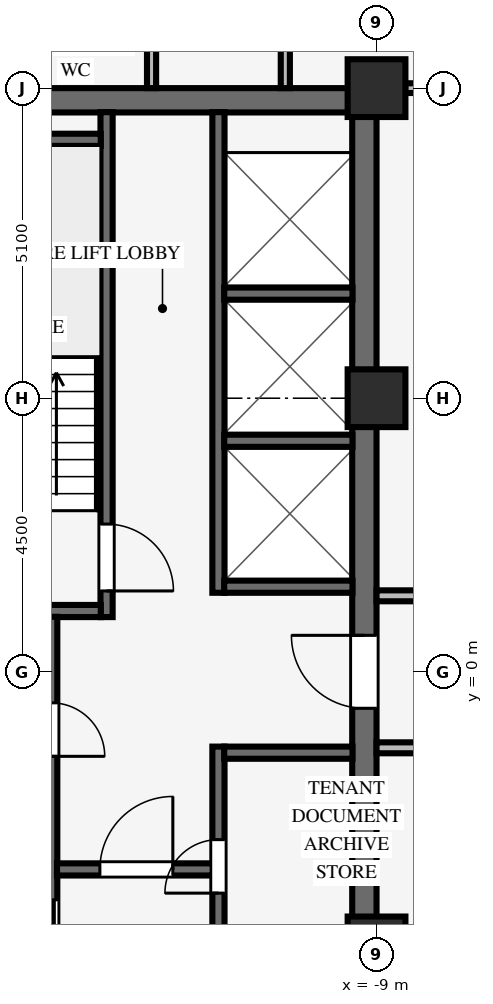
"""IFC4 building model, lengths in metres.
Left out: names, types, materials, properties, quantities, classifications, styles, units other than length and angle.
Written with IfcOpenShell. Run it as: python <this file> out.ifc"""

import sys

from ifc_helpers import new_model, si_unit, direction, frame, frame_2d, origin, origin_2d, place, context, subcontext, project, spatial, rectangle, extrude, source, transform, mapped, element, fill, save


model = new_model("IFC4")
c1 = context("Model", 3, precision=1e-05, world=origin(), true_north=direction((0.0, 1.0)))
c2 = subcontext(c1, "Body", "Model", "MODEL_VIEW")
j1 = project(units=[si_unit("LENGTHUNIT", "METRE"), si_unit("PLANEANGLEUNIT", "RADIAN")], contexts=[c1])
p1 = place(None, origin())
s1 = spatial("IfcSite", under=j1, at=p1, CompositionType="ELEMENT")
p2 = place(p1, origin())
s2 = spatial("IfcBuilding", under=s1, at=p2, CompositionType="ELEMENT")
p3 = place(p2, frame((0.0, 0.0, 164.0)))
s3 = spatial("IfcBuildingStorey", under=s2, at=p3, CompositionType="ELEMENT", Elevation=164.0)
p4 = place(p3, frame((-17.5, 9.4, 0.0), z_axis=(0.0, 0.0, 1.0), x_axis=(1.0, 0.0, 0.0)))
e1 = element("IfcWall", 1, at=p4, inside=s3, PredefinedType="SHEAR", context=c2, shape_type="SweptSolid", body=[
    extrude(rectangle(XDim=8.5, YDim=0.4, at=frame_2d((4.25, 0.0))), origin(), (0.0, 0.0, 1.0), 3.25),
])
p5 = place(p3, frame((-9.2, -9.205, 0.0), z_axis=(0.0, 0.0, 1.0), x_axis=(0.0, 1.0, 0.0)))
e2 = element("IfcWall", 2, at=p5, inside=s3, PredefinedType="SHEAR", context=c2, shape_type="SweptSolid", body=[
    extrude(rectangle(XDim=18.41, YDim=0.4, at=frame_2d((9.205, 0.0))), origin(), (0.0, 0.0, 1.0), 3.25),
])
p6 = place(p5, frame((8.605, 0.0, 0.0)))
e3 = element("IfcOpeningElement", 3, at=p6, cuts=e2, PredefinedType="OPENING", context=c2, shape_type="SweptSolid", body=[
    extrude(rectangle(XDim=1.2, YDim=2.15, at=frame_2d((0.6, 1.075))), frame((0.0, 0.21, 0.0), z_axis=(0.0, -1.0, 0.0), x_axis=(1.0, 0.0, 0.0)), (0.0, 0.0, 1.0), 0.42),
])
for number, where, z_axis, x_axis in (
    (4, (-9.0, -4.5, 0.0), (0.0, 0.0, 1.0), (1.0, 0.0, 0.0)),
    (5, (-9.0, 4.5, 0.0), (0.0, 0.0, 1.0), (1.0, 0.0, 0.0)),
    (6, (-9.0, 9.6, 0.0), (0.0, 0.0, 1.0), (1.0, 0.0, 0.0)),
):
    element("IfcColumn", number, at=place(p3, frame(where, z_axis=z_axis, x_axis=x_axis)), inside=s3, PredefinedType="COLUMN", context=c2, shape_type="SweptSolid", body=[
        extrude(rectangle(XDim=0.95, YDim=0.95, at=origin_2d()), origin(), (0.0, 0.0, 1.0), 3.25),
    ])
p7 = place(p3, frame((-13.44, 0.9, 0.0), z_axis=(0.0, 0.0, 1.0), x_axis=(0.0, 1.0, 0.0)))
e7 = element("IfcWall", 7, at=p7, inside=s3, PredefinedType="SHEAR", context=c2, shape_type="SweptSolid", body=[
    extrude(rectangle(XDim=8.305, YDim=0.2, at=frame_2d((4.153, 0.0))), origin(), (0.0, 0.0, 1.0), 3.25),
])
p8 = place(p7, frame((1.53, 0.0, 0.0), z_axis=(0.0, 0.0, 1.0), x_axis=(-1.0, 0.0, 0.0)))
e8 = element("IfcOpeningElement", 8, at=p8, cuts=e7, PredefinedType="OPENING", context=c2, shape_type="SweptSolid", body=[
    extrude(rectangle(XDim=1.1, YDim=2.15, at=frame_2d((0.55, 1.075))), frame((0.0, 0.11, 0.0), z_axis=(0.0, -1.0, 0.0), x_axis=(1.0, 0.0, 0.0)), (0.0, 0.0, 1.0), 0.22),
])
for number, where, z_axis, x_axis in (
    (9, (-17.105, 1.0, 0.0), (0.0, 0.0, 1.0), (1.0, 0.0, 0.0)),
    (10, (-17.105, 8.75, 0.0), (0.0, 0.0, 1.0), (1.0, 0.0, 0.0)),
):
    element("IfcWall", number, at=place(p3, frame(where, z_axis=z_axis, x_axis=x_axis)), inside=s3, PredefinedType="SHEAR", context=c2, shape_type="SweptSolid", body=[
        extrude(rectangle(XDim=3.57, YDim=0.2, at=frame_2d((1.785, 0.0))), origin(), (0.0, 0.0, 1.0), 3.25),
    ])
p9 = place(p3, frame((-14.35, -6.2, 0.0), z_axis=(0.0, 0.0, 1.0), x_axis=(0.0, 1.0, 0.0)))
e11 = element("IfcWall", 11, at=p9, inside=s3, PredefinedType="SHEAR", context=c2, shape_type="SweptSolid", body=[
    extrude(rectangle(XDim=7.105, YDim=0.2, at=frame_2d((3.552, 0.0))), origin(), (0.0, 0.0, 1.0), 3.25),
])
p10 = place(p9, frame((5.69, 0.0, 0.0), z_axis=(0.0, 0.0, 1.0), x_axis=(-1.0, 0.0, 0.0)))
e12 = element("IfcOpeningElement", 12, at=p10, cuts=e11, PredefinedType="OPENING", context=c2, shape_type="SweptSolid", body=[
    extrude(rectangle(XDim=0.88, YDim=2.1, at=frame_2d((0.44, 1.05))), frame((0.0, 0.11, 0.0), z_axis=(0.0, -1.0, 0.0), x_axis=(1.0, 0.0, 0.0)), (0.0, 0.0, 1.0), 0.22),
])
p11 = place(p9, frame((1.15, 0.0, 0.0)))
e13 = element("IfcOpeningElement", 13, at=p11, cuts=e11, PredefinedType="OPENING", context=c2, shape_type="SweptSolid", body=[
    extrude(rectangle(XDim=1.3, YDim=2.2, at=frame_2d((0.65, 1.1))), frame((0.0, 0.11, 0.0), z_axis=(0.0, -1.0, 0.0), x_axis=(1.0, 0.0, 0.0)), (0.0, 0.0, 1.0), 0.22),
])
p12 = place(p3, frame((-11.6, -9.205, 0.0), z_axis=(0.0, 0.0, 1.0), x_axis=(0.0, 1.0, 0.0)))
e14 = element("IfcWall", 14, at=p12, inside=s3, PredefinedType="SHEAR", context=c2, shape_type="SweptSolid", body=[
    extrude(rectangle(XDim=7.975, YDim=0.2, at=frame_2d((3.988, 0.0))), origin(), (0.0, 0.0, 1.0), 3.25),
])
p13 = place(p12, frame((1.565, 0.0, 0.0)))
e15 = element("IfcOpeningElement", 15, at=p13, cuts=e14, PredefinedType="OPENING", context=c2, shape_type="SweptSolid", body=[
    extrude(rectangle(XDim=0.88, YDim=2.1, at=frame_2d((0.44, 1.05))), frame((0.0, 0.11, 0.0), z_axis=(0.0, -1.0, 0.0), x_axis=(1.0, 0.0, 0.0)), (0.0, 0.0, 1.0), 0.22),
])
p14 = place(p12, frame((5.565, 0.0, 0.0)))
e16 = element("IfcOpeningElement", 16, at=p14, cuts=e14, PredefinedType="OPENING", context=c2, shape_type="SweptSolid", body=[
    extrude(rectangle(XDim=0.88, YDim=2.1, at=frame_2d((0.44, 1.05))), frame((0.0, 0.11, 0.0), z_axis=(0.0, -1.0, 0.0), x_axis=(1.0, 0.0, 0.0)), (0.0, 0.0, 1.0), 0.22),
])
p15 = place(p3, frame((-14.255, -3.25, 0.0), z_axis=(0.0, 0.0, 1.0), x_axis=(1.0, 0.0, 0.0)))
e17 = element("IfcWall", 17, at=p15, inside=s3, PredefinedType="SHEAR", context=c2, shape_type="SweptSolid", body=[
    extrude(rectangle(XDim=2.56, YDim=0.2, at=frame_2d((1.28, 0.0))), origin(), (0.0, 0.0, 1.0), 3.25),
])
p16 = place(p15, frame((0.705, 0.0, 0.0)))
e18 = element("IfcOpeningElement", 18, at=p16, cuts=e17, PredefinedType="OPENING", context=c2, shape_type="SweptSolid", body=[
    extrude(rectangle(XDim=1.2, YDim=2.15, at=frame_2d((0.6, 1.075))), frame((0.0, 0.11, 0.0), z_axis=(0.0, -1.0, 0.0), x_axis=(1.0, 0.0, 0.0)), (0.0, 0.0, 1.0), 0.22),
])
p17 = place(p3, frame((-11.505, -1.33, 0.0), z_axis=(0.0, 0.0, 1.0), x_axis=(1.0, 0.0, 0.0)))
e19 = element("IfcWall", 19, at=p17, inside=s3, PredefinedType="SHEAR", context=c2, shape_type="SweptSolid", body=[
    extrude(rectangle(XDim=2.11, YDim=0.2, at=frame_2d((1.055, 0.0))), origin(), (0.0, 0.0, 1.0), 3.25),
])
p18 = place(p3, frame((-11.6, 1.3, 0.0), z_axis=(0.0, 0.0, 1.0), x_axis=(0.0, 1.0, 0.0)))
e20 = element("IfcWall", 20, at=p18, inside=s3, PredefinedType="SHEAR", context=c2, shape_type="SweptSolid", body=[
    extrude(rectangle(XDim=7.905, YDim=0.2, at=frame_2d((3.953, 0.0))), origin(), (0.0, 0.0, 1.0), 3.25),
])
for number, where, z_axis, x_axis in (
    (21, (-11.505, 1.4, 0.0), (0.0, 0.0, 1.0), (1.0, 0.0, 0.0)),
    (22, (-11.505, 3.8, 0.0), (0.0, 0.0, 1.0), (1.0, 0.0, 0.0)),
    (23, (-11.505, 6.22, 0.0), (0.0, 0.0, 1.0), (1.0, 0.0, 0.0)),
):
    element("IfcWall", number, at=place(p3, frame(where, z_axis=z_axis, x_axis=x_axis)), inside=s3, PredefinedType="SHEAR", context=c2, shape_type="SweptSolid", body=[
        extrude(rectangle(XDim=2.11, YDim=0.2, at=frame_2d((1.055, 0.0))), origin(), (0.0, 0.0, 1.0), 3.25),
    ])
p19 = place(p3, frame((-9.0, -1.25, 0.0), z_axis=(0.0, 0.0, 1.0), x_axis=(1.0, 0.0, 0.0)))
e24 = element("IfcWall", 24, at=p19, inside=s3, PredefinedType="PARTITIONING", context=c2, shape_type="SweptSolid", body=[
    extrude(rectangle(XDim=15.6, YDim=0.18, at=frame_2d((7.8, 0.0))), origin(), (0.0, 0.0, 1.0), 3.24),
])
p20 = place(p19, frame((7.32, 0.0, 0.0)))
e25 = element("IfcOpeningElement", 25, at=p20, cuts=e24, PredefinedType="OPENING", context=c2, shape_type="SweptSolid", body=[
    extrude(rectangle(XDim=0.96, YDim=2.1, at=frame_2d((0.48, 1.05))), frame((0.0, 0.1, 0.0), z_axis=(0.0, -1.0, 0.0), x_axis=(1.0, 0.0, 0.0)), (0.0, 0.0, 1.0), 0.2),
])
p21 = place(p3, frame((-9.0, 1.25, 0.0), z_axis=(0.0, 0.0, 1.0), x_axis=(1.0, 0.0, 0.0)))
e26 = element("IfcWall", 26, at=p21, inside=s3, PredefinedType="PARTITIONING", context=c2, shape_type="SweptSolid", body=[
    extrude(rectangle(XDim=15.6, YDim=0.18, at=frame_2d((7.8, 0.0))), origin(), (0.0, 0.0, 1.0), 3.24),
])
p22 = place(p21, frame((3.32, 0.0, 0.0)))
e27 = element("IfcOpeningElement", 27, at=p22, cuts=e26, PredefinedType="OPENING", context=c2, shape_type="SweptSolid", body=[
    extrude(rectangle(XDim=0.96, YDim=2.1, at=frame_2d((0.48, 1.05))), frame((0.0, 0.1, 0.0), z_axis=(0.0, -1.0, 0.0), x_axis=(1.0, 0.0, 0.0)), (0.0, 0.0, 1.0), 0.2),
])
p23 = place(p3, frame((-8.529, 9.6, 0.0), z_axis=(0.0, 0.0, 1.0), x_axis=(1.0, 0.0, 0.0)))
e28 = element("IfcWall", 28, at=p23, inside=s3, PredefinedType="PARTITIONING", context=c2, shape_type="SweptSolid", body=[
    extrude(rectangle(XDim=8.353, YDim=0.16, at=frame_2d((4.177, 0.0))), origin(), (0.0, 0.0, 1.0), 2.285),
])
for number, where, z_axis, x_axis in (
    (29, (-12.7, 9.6, 0.0), (0.0, 0.0, 1.0), (0.0, 1.0, 0.0)),
    (30, (-10.5, 9.6, 0.0), (0.0, 0.0, 1.0), (0.0, 1.0, 0.0)),
):
    element("IfcWall", number, at=place(p3, frame(where, z_axis=z_axis, x_axis=x_axis)), inside=s3, PredefinedType="PARTITIONING", context=c2, shape_type="SweptSolid", body=[
        extrude(rectangle(XDim=3.814, YDim=0.15, at=frame_2d((1.907, 0.0))), origin(), (0.0, 0.0, 1.0), 3.24),
    ])
m1 = source(origin(), c2, "Body", "SweptSolid", [
    extrude(rectangle(XDim=1.1, YDim=2.15, at=frame_2d((0.55, 1.075))), frame((0.0, 0.025, 0.0), z_axis=(0.0, -1.0, 0.0), x_axis=(1.0, 0.0, 0.0)), (0.0, 0.0, 1.0), 0.05),
])
p24 = place(p8, origin())
e31 = element("IfcDoor", 31, at=p24, inside=s3, OperationType="SINGLE_SWING_RIGHT", PredefinedType="DOOR", context=c2, shape_type="MappedRepresentation", body=[
    mapped(m1, transform((0.0, 0.0, 0.0), scale=1.0)),
])
fill(e8, e31)
m2 = source(origin(), c2, "Body", "SweptSolid", [
    extrude(rectangle(XDim=0.88, YDim=2.1, at=frame_2d((0.44, 1.05))), frame((0.0, 0.025, 0.0), z_axis=(0.0, -1.0, 0.0), x_axis=(1.0, 0.0, 0.0)), (0.0, 0.0, 1.0), 0.05),
])
p25 = place(p10, origin())
e32 = element("IfcDoor", 32, at=p25, inside=s3, OperationType="SINGLE_SWING_RIGHT", PredefinedType="DOOR", context=c2, shape_type="MappedRepresentation", body=[
    mapped(m2, transform((0.0, 0.0, 0.0), scale=1.0)),
])
fill(e12, e32)
m3 = source(origin(), c2, "Body", "SweptSolid", [
    extrude(rectangle(XDim=1.2, YDim=2.15, at=frame_2d((0.6, 1.075))), frame((0.0, 0.025, 0.0), z_axis=(0.0, -1.0, 0.0), x_axis=(1.0, 0.0, 0.0)), (0.0, 0.0, 1.0), 0.05),
])
p26 = place(p16, origin())
e33 = element("IfcDoor", 33, at=p26, inside=s3, OperationType="SINGLE_SWING_RIGHT", PredefinedType="DOOR", context=c2, shape_type="MappedRepresentation", body=[
    mapped(m3, transform((0.0, 0.0, 0.0), scale=1.0)),
])
fill(e18, e33)
p27 = place(p14, origin())
e34 = element("IfcDoor", 34, at=p27, inside=s3, OperationType="SINGLE_SWING_LEFT", PredefinedType="DOOR", context=c2, shape_type="MappedRepresentation", body=[
    mapped(m2, transform((0.0, 0.0, 0.0), scale=1.0)),
])
fill(e16, e34)
p28 = place(p6, origin())
e35 = element("IfcDoor", 35, at=p28, inside=s3, OperationType="SINGLE_SWING_RIGHT", PredefinedType="DOOR", context=c2, shape_type="MappedRepresentation", body=[
    mapped(m3, transform((0.0, 0.0, 0.0), scale=1.0)),
])
fill(e3, e35)
m4 = source(origin(), c2, "Body", "SweptSolid", [
    extrude(rectangle(XDim=1.3, YDim=2.2, at=frame_2d((0.65, 1.1))), frame((0.0, 0.025, 0.0), z_axis=(0.0, -1.0, 0.0), x_axis=(1.0, 0.0, 0.0)), (0.0, 0.0, 1.0), 0.05),
])
p29 = place(p11, origin())
e36 = element("IfcDoor", 36, at=p29, inside=s3, OperationType="DOUBLE_DOOR_SLIDING", PredefinedType="DOOR", context=c2, shape_type="MappedRepresentation", body=[
    mapped(m4, transform((0.0, 0.0, 0.0), scale=1.0)),
])
fill(e13, e36)
save(model, sys.argv[1])
